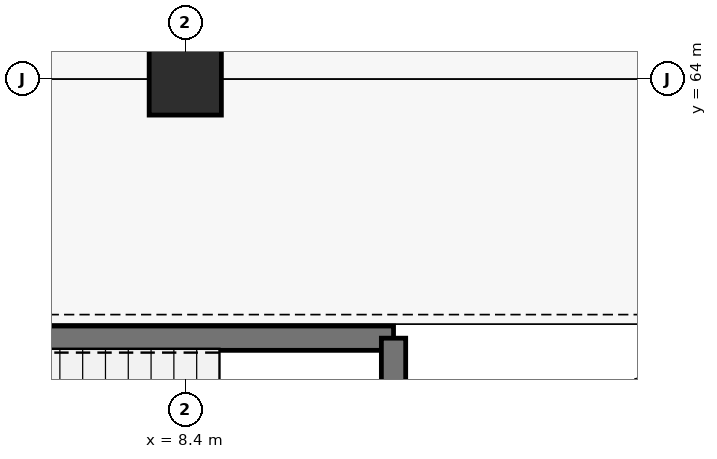
"""IFC4 building model, lengths in metres.
Left out: names, types, materials, properties, quantities, classifications, styles, units other than length and angle.
Written with IfcOpenShell. Run it as: python <this file> out.ifc"""

import sys

from ifc_helpers import new_model, si_unit, direction, frame, frame_2d, origin, origin_2d, place, context, subcontext, project, spatial, rectangle, circle, extrude, element, save


model = new_model("IFC4")
c1 = context("Model", 3, precision=1e-05, world=origin(), true_north=direction((0.0, 1.0)))
c2 = subcontext(c1, "Body", "Model", "MODEL_VIEW")
j1 = project(units=[si_unit("LENGTHUNIT", "METRE"), si_unit("PLANEANGLEUNIT", "RADIAN")], contexts=[c1])
p1 = place(None, origin())
s1 = spatial("IfcSite", under=j1, at=p1, CompositionType="ELEMENT")
p2 = place(p1, origin())
s2 = spatial("IfcBuilding", under=s1, at=p2, CompositionType="ELEMENT")
p3 = place(p2, origin())
s3 = spatial("IfcBuildingStorey", under=s2, at=p3, CompositionType="ELEMENT", Elevation=0.0)
p4 = place(p3, frame((8.4, 64.0, -0.46), z_axis=(0.0, 0.0, 1.0), x_axis=(1.0, 0.0, 0.0)))
e1 = element("IfcColumn", 1, at=p4, inside=s3, PredefinedType="COLUMN", context=c2, shape_type="SweptSolid", body=[
    extrude(circle(Radius=0.475, at=origin_2d()), origin(), (0.0, 0.0, 1.0), 5.9),
])
p5 = place(p3, frame((2.26, 60.59, 0.0), z_axis=(0.0, 0.0, 1.0), x_axis=(1.0, 0.0, 0.0)))
e2 = element("IfcWall", 2, at=p5, inside=s3, PredefinedType="SHEAR", context=c2, shape_type="SweptSolid", body=[
    extrude(rectangle(XDim=8.88, YDim=0.32, at=frame_2d((4.44, 0.0))), origin(), (0.0, 0.0, 1.0), 5.44),
])
p6 = place(p3, frame((11.14, 56.86, 0.0), z_axis=(0.0, 0.0, 1.0), x_axis=(0.0, 1.0, 0.0)))
e3 = element("IfcWall", 3, at=p6, inside=s3, PredefinedType="SHEAR", context=c2, shape_type="SweptSolid", body=[
    extrude(rectangle(XDim=3.73, YDim=0.32, at=frame_2d((1.865, 0.0))), origin(), (0.0, 0.0, 1.0), 5.44),
])
save(model, sys.argv[1])
